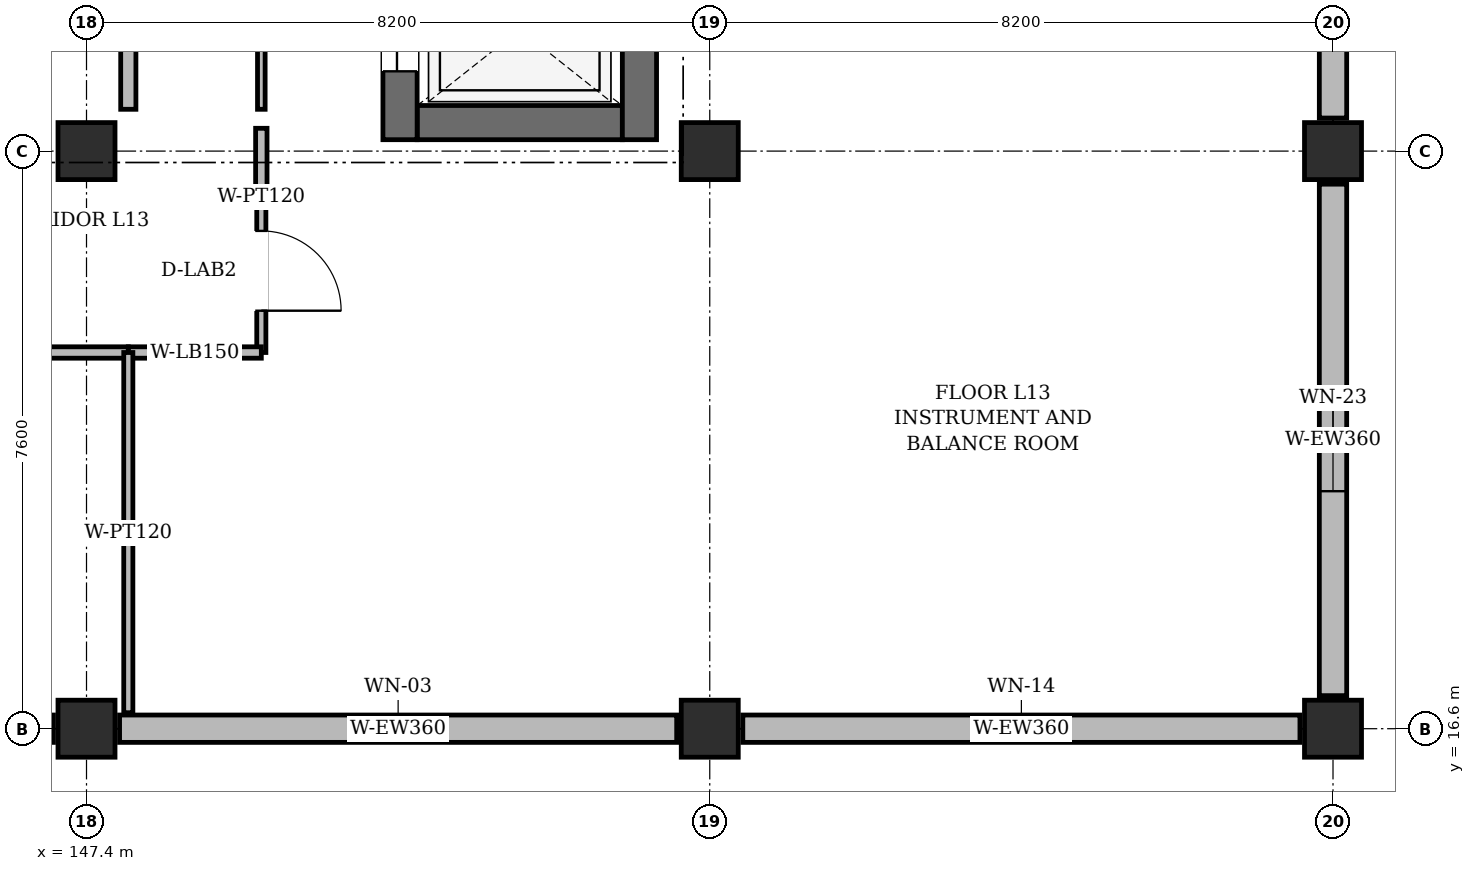
"""IFC4 building model, lengths in metres.
Left out: names, types, materials, properties, quantities, classifications, styles, units other than length and angle.
Written with IfcOpenShell. Run it as: python <this file> out.ifc"""

import sys

from ifc_helpers import new_model, si_unit, direction, frame, frame_2d, origin, origin_2d, place, context, subcontext, project, spatial, rectangle, extrude, element, fill, save


model = new_model("IFC4")
c1 = context("Model", 3, precision=1e-05, world=origin(), true_north=direction((0.0, 1.0)))
c2 = subcontext(c1, "Body", "Model", "MODEL_VIEW")
j1 = project(units=[si_unit("LENGTHUNIT", "METRE"), si_unit("PLANEANGLEUNIT", "RADIAN")], contexts=[c1])
p1 = place(None, origin())
s1 = spatial("IfcSite", under=j1, at=p1, CompositionType="ELEMENT")
p2 = place(p1, origin())
s2 = spatial("IfcBuilding", under=s1, at=p2, CompositionType="ELEMENT")
p3 = place(p2, frame((0.0, 0.0, 57.6)))
s3 = spatial("IfcBuildingStorey", under=s2, at=p3, CompositionType="ELEMENT", Elevation=57.6)
for number, where, z_axis, x_axis in (
    (1, (147.4, 16.6, 0.0), (0.0, 0.0, 1.0), (1.0, 0.0, 0.0)),
    (2, (147.4, 24.2, 0.0), (0.0, 0.0, 1.0), (1.0, 0.0, 0.0)),
    (3, (155.6, 16.6, 0.0), (0.0, 0.0, 1.0), (1.0, 0.0, 0.0)),
    (4, (155.6, 24.2, 0.0), (0.0, 0.0, 1.0), (1.0, 0.0, 0.0)),
    (5, (163.8, 16.6, 0.0), (0.0, 0.0, 1.0), (1.0, 0.0, 0.0)),
    (6, (163.8, 24.2, 0.0), (0.0, 0.0, 1.0), (1.0, 0.0, 0.0)),
):
    element("IfcColumn", number, at=place(p3, frame(where, z_axis=z_axis, x_axis=x_axis)), inside=s3, PredefinedType="COLUMN", context=c2, shape_type="SweptSolid", body=[
        extrude(rectangle(XDim=0.75, YDim=0.75, at=origin_2d()), origin(), (0.0, 0.0, 1.0), 3.92),
    ])
p4 = place(p3, frame((139.635, 16.6, 0.0), z_axis=(0.0, 0.0, 1.0), x_axis=(1.0, 0.0, 0.0)))
e7 = element("IfcWall", 7, at=p4, inside=s3, PredefinedType="SOLIDWALL", context=c2, shape_type="SweptSolid", body=[
    extrude(rectangle(XDim=7.33, YDim=0.36, at=frame_2d((3.665, 0.0))), origin(), (0.0, 0.0, 1.0), 3.305),
])
p5 = place(p4, frame((2.89, 0.0, 0.95)))
e8 = element("IfcOpeningElement", 8, at=p5, cuts=e7, PredefinedType="OPENING", context=c2, shape_type="SweptSolid", body=[
    extrude(rectangle(XDim=1.55, YDim=2.05, at=frame_2d((0.775, 1.025))), frame((0.0, 0.192, 0.0), z_axis=(0.0, -1.0, 0.0), x_axis=(1.0, 0.0, 0.0)), (0.0, 0.0, 1.0), 0.384),
])
p6 = place(p3, frame((147.835, 16.6, 0.0), z_axis=(0.0, 0.0, 1.0), x_axis=(1.0, 0.0, 0.0)))
e9 = element("IfcWall", 9, at=p6, inside=s3, PredefinedType="SOLIDWALL", context=c2, shape_type="SweptSolid", body=[
    extrude(rectangle(XDim=7.33, YDim=0.36, at=frame_2d((3.665, 0.0))), origin(), (0.0, 0.0, 1.0), 3.305),
])
p7 = place(p6, frame((3.29, 0.0, 0.95)))
e10 = element("IfcOpeningElement", 10, at=p7, cuts=e9, PredefinedType="OPENING", context=c2, shape_type="SweptSolid", body=[
    extrude(rectangle(XDim=0.75, YDim=1.8, at=frame_2d((0.375, 0.9))), frame((0.0, 0.192, 0.0), z_axis=(0.0, -1.0, 0.0), x_axis=(1.0, 0.0, 0.0)), (0.0, 0.0, 1.0), 0.384),
])
p8 = place(p3, frame((156.035, 16.6, 0.0), z_axis=(0.0, 0.0, 1.0), x_axis=(1.0, 0.0, 0.0)))
e11 = element("IfcWall", 11, at=p8, inside=s3, PredefinedType="SOLIDWALL", context=c2, shape_type="SweptSolid", body=[
    extrude(rectangle(XDim=7.33, YDim=0.36, at=frame_2d((3.665, 0.0))), origin(), (0.0, 0.0, 1.0), 3.305),
])
p9 = place(p8, frame((3.19, 0.0, 0.95)))
e12 = element("IfcOpeningElement", 12, at=p9, cuts=e11, PredefinedType="OPENING", context=c2, shape_type="SweptSolid", body=[
    extrude(rectangle(XDim=0.95, YDim=1.5, at=frame_2d((0.475, 0.75))), frame((0.0, 0.192, 0.0), z_axis=(0.0, -1.0, 0.0), x_axis=(1.0, 0.0, 0.0)), (0.0, 0.0, 1.0), 0.384),
])
p10 = place(p3, frame((163.8, 17.035, 0.0), z_axis=(0.0, 0.0, 1.0), x_axis=(0.0, 1.0, 0.0)))
e13 = element("IfcWall", 13, at=p10, inside=s3, PredefinedType="SOLIDWALL", context=c2, shape_type="SweptSolid", body=[
    extrude(rectangle(XDim=6.73, YDim=0.36, at=frame_2d((3.365, 0.0))), origin(), (0.0, 0.0, 1.0), 3.305),
])
p11 = place(p10, frame((2.69, 0.0, 0.95)))
e14 = element("IfcOpeningElement", 14, at=p11, cuts=e13, PredefinedType="OPENING", context=c2, shape_type="SweptSolid", body=[
    extrude(rectangle(XDim=1.35, YDim=1.75, at=frame_2d((0.675, 0.875))), frame((0.0, 0.192, 0.0), z_axis=(0.0, -1.0, 0.0), x_axis=(1.0, 0.0, 0.0)), (0.0, 0.0, 1.0), 0.384),
])
p12 = place(p3, frame((163.8, 24.635, 0.0), z_axis=(0.0, 0.0, 1.0), x_axis=(0.0, 1.0, 0.0)))
e15 = element("IfcWall", 15, at=p12, inside=s3, PredefinedType="SOLIDWALL", context=c2, shape_type="SweptSolid", body=[
    extrude(rectangle(XDim=6.73, YDim=0.36, at=frame_2d((3.365, 0.0))), origin(), (0.0, 0.0, 1.0), 3.305),
])
p13 = place(p12, frame((2.59, 0.0, 0.95)))
e16 = element("IfcOpeningElement", 16, at=p13, cuts=e15, PredefinedType="OPENING", context=c2, shape_type="SweptSolid", body=[
    extrude(rectangle(XDim=1.55, YDim=1.5, at=frame_2d((0.775, 0.75))), frame((0.0, 0.192, 0.0), z_axis=(0.0, -1.0, 0.0), x_axis=(1.0, 0.0, 0.0)), (0.0, 0.0, 1.0), 0.384),
])
p14 = place(p3, frame((151.75, 24.575, 0.0), z_axis=(0.0, 0.0, 1.0), x_axis=(1.0, 0.0, 0.0)))
e17 = element("IfcWall", 17, at=p14, inside=s3, PredefinedType="SHEAR", context=c2, shape_type="SweptSolid", body=[
    extrude(rectangle(XDim=2.7, YDim=0.45, at=frame_2d((1.35, 0.0))), origin(), (0.0, 0.0, 1.0), 3.92),
])
p15 = place(p3, frame((151.525, 24.35, 0.0), z_axis=(0.0, 0.0, 1.0), x_axis=(0.0, 1.0, 0.0)))
e18 = element("IfcWall", 18, at=p15, inside=s3, PredefinedType="SHEAR", context=c2, shape_type="SweptSolid", body=[
    extrude(rectangle(XDim=2.9, YDim=0.45, at=frame_2d((1.45, 0.0))), origin(), (0.0, 0.0, 1.0), 3.92),
])
p16 = place(p15, frame((0.9, 0.0, 0.0)))
e19 = element("IfcOpeningElement", 19, at=p16, cuts=e18, PredefinedType="OPENING", context=c2, shape_type="SweptSolid", body=[
    extrude(rectangle(XDim=1.1, YDim=2.2, at=frame_2d((0.55, 1.1))), frame((0.0, 0.237, 0.0), z_axis=(0.0, -1.0, 0.0), x_axis=(1.0, 0.0, 0.0)), (0.0, 0.0, 1.0), 0.474),
])
p17 = place(p3, frame((154.675, 24.35, 0.0), z_axis=(0.0, 0.0, 1.0), x_axis=(0.0, 1.0, 0.0)))
e20 = element("IfcWall", 20, at=p17, inside=s3, PredefinedType="SHEAR", context=c2, shape_type="SweptSolid", body=[
    extrude(rectangle(XDim=2.9, YDim=0.45, at=frame_2d((1.45, 0.0))), origin(), (0.0, 0.0, 1.0), 3.92),
])
p18 = place(p3, frame((147.95, 31.75, 0.0), z_axis=(0.0, 0.0, 1.0), x_axis=(0.0, -1.0, 0.0)))
e21 = element("IfcWall", 21, at=p18, inside=s3, PredefinedType="PARTITIONING", context=c2, shape_type="SweptSolid", body=[
    extrude(rectangle(XDim=7.0, YDim=0.2, at=frame_2d((3.5, 0.0))), origin(), (0.0, 0.0, 1.0), 3.805),
])
p19 = place(p18, frame((2.75, 0.0, 0.0)))
e22 = element("IfcOpeningElement", 22, at=p19, cuts=e21, PredefinedType="OPENING", context=c2, shape_type="SweptSolid", body=[
    extrude(rectangle(XDim=1.5, YDim=2.2, at=frame_2d((0.75, 1.1))), frame((0.0, 0.112, 0.0), z_axis=(0.0, -1.0, 0.0), x_axis=(1.0, 0.0, 0.0)), (0.0, 0.0, 1.0), 0.224),
])
p20 = place(p3, frame((149.7, 24.75, 0.0), z_axis=(0.0, 0.0, 1.0), x_axis=(0.0, 1.0, 0.0)))
e23 = element("IfcWall", 23, at=p20, inside=s3, PredefinedType="PARTITIONING", context=c2, shape_type="SweptSolid", body=[
    extrude(rectangle(XDim=11.3, YDim=0.1, at=frame_2d((5.65, 0.0))), origin(), (0.0, 0.0, 1.0), 3.805),
])
p21 = place(p20, frame((4.75, 0.0, 0.0)))
e24 = element("IfcOpeningElement", 24, at=p21, cuts=e23, PredefinedType="OPENING", context=c2, shape_type="SweptSolid", body=[
    extrude(rectangle(XDim=1.8, YDim=2.4, at=frame_2d((0.9, 1.2))), frame((0.0, 0.062, 0.0), z_axis=(0.0, -1.0, 0.0), x_axis=(1.0, 0.0, 0.0)), (0.0, 0.0, 1.0), 0.124),
])
p22 = place(p3, frame((147.95, 21.55, 0.0), z_axis=(0.0, 0.0, 1.0), x_axis=(-1.0, 0.0, 0.0)))
e25 = element("IfcWall", 25, at=p22, inside=s3, PredefinedType="PARTITIONING", context=c2, shape_type="SweptSolid", body=[
    extrude(rectangle(XDim=8.75, YDim=0.15, at=frame_2d((4.375, 0.0))), origin(), (0.0, 0.0, 1.0), 3.495),
])
p23 = place(p22, frame((3.675, 0.0, 0.0)))
e26 = element("IfcOpeningElement", 26, at=p23, cuts=e25, PredefinedType="OPENING", context=c2, shape_type="SweptSolid", body=[
    extrude(rectangle(XDim=1.4, YDim=2.2, at=frame_2d((0.7, 1.1))), frame((0.0, 0.087, 0.0), z_axis=(0.0, -1.0, 0.0), x_axis=(1.0, 0.0, 0.0)), (0.0, 0.0, 1.0), 0.174),
])
p24 = place(p3, frame((149.7, 24.5, 0.0), z_axis=(0.0, 0.0, 1.0), x_axis=(0.0, -1.0, 0.0)))
e27 = element("IfcWall", 27, at=p24, inside=s3, PredefinedType="PARTITIONING", context=c2, shape_type="SweptSolid", body=[
    extrude(rectangle(XDim=0.8, YDim=0.15, at=frame_2d((0.4, 0.0))), origin(), (0.0, 0.0, 1.0), 3.805),
])
p25 = place(p3, frame((149.7, 23.7, 0.0), z_axis=(0.0, 0.0, 1.0), x_axis=(0.0, -1.0, 0.0)))
e28 = element("IfcWall", 28, at=p25, inside=s3, PredefinedType="PARTITIONING", context=c2, shape_type="SweptSolid", body=[
    extrude(rectangle(XDim=2.15, YDim=0.12, at=frame_2d((1.075, 0.0))), origin(), (0.0, 0.0, 1.0), 3.805),
])
p26 = place(p25, frame((0.55, 0.0, 0.0)))
e29 = element("IfcOpeningElement", 29, at=p26, cuts=e28, PredefinedType="OPENING", context=c2, shape_type="SweptSolid", body=[
    extrude(rectangle(XDim=1.05, YDim=2.2, at=frame_2d((0.525, 1.1))), frame((0.0, 0.072, 0.0), z_axis=(0.0, -1.0, 0.0), x_axis=(1.0, 0.0, 0.0)), (0.0, 0.0, 1.0), 0.144),
])
p27 = place(p3, frame((149.7, 21.55, 0.0), z_axis=(0.0, 0.0, 1.0), x_axis=(-1.0, 0.0, 0.0)))
e30 = element("IfcWall", 30, at=p27, inside=s3, PredefinedType="PARTITIONING", context=c2, shape_type="SweptSolid", body=[
    extrude(rectangle(XDim=1.75, YDim=0.15, at=frame_2d((0.875, 0.0))), origin(), (0.0, 0.0, 1.0), 3.495),
])
p28 = place(p3, frame((147.95, 21.55, 0.0), z_axis=(0.0, 0.0, 1.0), x_axis=(0.0, -1.0, 0.0)))
e31 = element("IfcWall", 31, at=p28, inside=s3, PredefinedType="PARTITIONING", context=c2, shape_type="SweptSolid", body=[
    extrude(rectangle(XDim=4.74, YDim=0.12, at=frame_2d((2.37, 0.0))), origin(), (0.0, 0.0, 1.0), 3.805),
])
p29 = place(p7, origin())
e32 = element("IfcWindow", 32, at=p29, inside=s3, PartitioningType="SINGLE_PANEL", PredefinedType="WINDOW", context=c2, shape_type="SweptSolid", body=[
    extrude(rectangle(XDim=0.75, YDim=1.8, at=frame_2d((0.375, 0.9))), frame((0.0, 0.03, 0.0), z_axis=(0.0, -1.0, 0.0), x_axis=(1.0, 0.0, 0.0)), (0.0, 0.0, 1.0), 0.06),
])
fill(e10, e32)
p30 = place(p9, origin())
e33 = element("IfcWindow", 33, at=p30, inside=s3, PartitioningType="SINGLE_PANEL", PredefinedType="WINDOW", context=c2, shape_type="SweptSolid", body=[
    extrude(rectangle(XDim=0.95, YDim=1.5, at=frame_2d((0.475, 0.75))), frame((0.0, 0.03, 0.0), z_axis=(0.0, -1.0, 0.0), x_axis=(1.0, 0.0, 0.0)), (0.0, 0.0, 1.0), 0.06),
])
fill(e12, e33)
p31 = place(p11, origin())
e34 = element("IfcWindow", 34, at=p31, inside=s3, PartitioningType="SINGLE_PANEL", PredefinedType="WINDOW", context=c2, shape_type="SweptSolid", body=[
    extrude(rectangle(XDim=1.35, YDim=1.75, at=frame_2d((0.675, 0.875))), frame((0.0, 0.03, 0.0), z_axis=(0.0, -1.0, 0.0), x_axis=(1.0, 0.0, 0.0)), (0.0, 0.0, 1.0), 0.06),
])
fill(e14, e34)
p32 = place(p16, origin())
e35 = element("IfcDoor", 35, at=p32, inside=s3, OperationType="DOUBLE_DOOR_SLIDING", PredefinedType="DOOR", context=c2, shape_type="SweptSolid", body=[
    extrude(rectangle(XDim=1.1, YDim=2.2, at=frame_2d((0.55, 1.1))), frame((0.0, 0.025, 0.0), z_axis=(0.0, -1.0, 0.0), x_axis=(1.0, 0.0, 0.0)), (0.0, 0.0, 1.0), 0.05),
])
fill(e19, e35)
p33 = place(p26, origin())
e36 = element("IfcDoor", 36, at=p33, inside=s3, OperationType="SINGLE_SWING_RIGHT", PredefinedType="DOOR", context=c2, shape_type="SweptSolid", body=[
    extrude(rectangle(XDim=1.05, YDim=2.2, at=frame_2d((0.525, 1.1))), frame((0.0, 0.025, 0.0), z_axis=(0.0, -1.0, 0.0), x_axis=(1.0, 0.0, 0.0)), (0.0, 0.0, 1.0), 0.05),
])
fill(e29, e36)
save(model, sys.argv[1])
